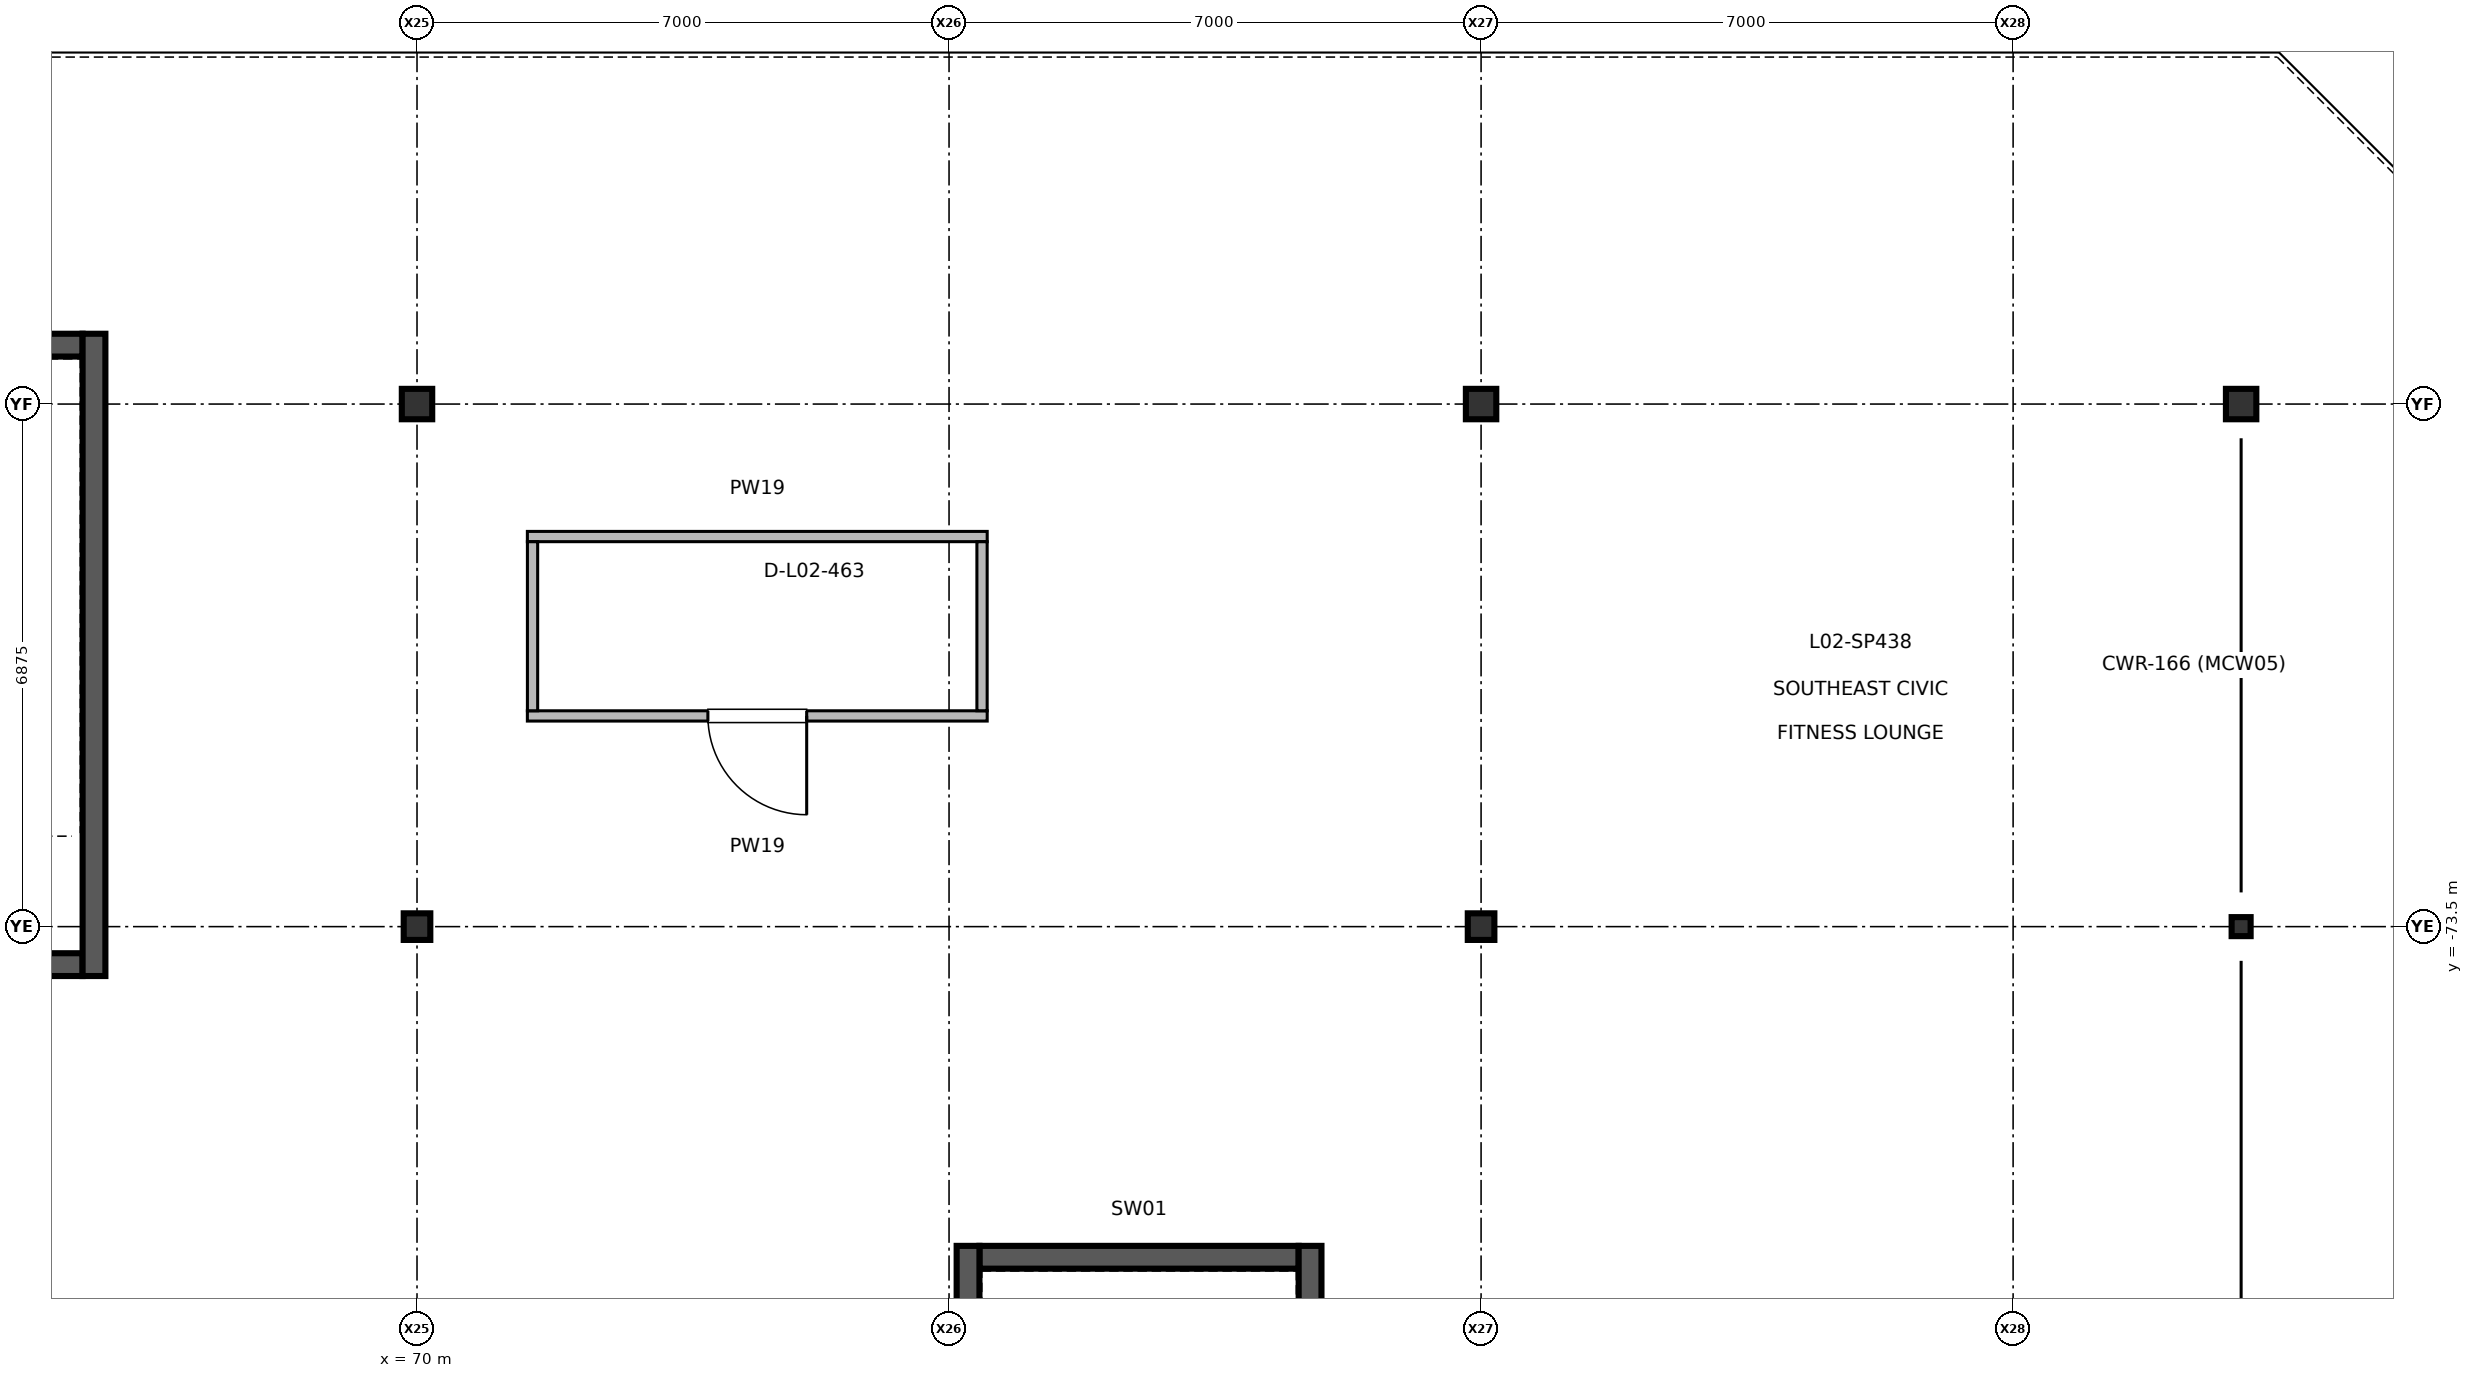
"""IFC4 building model, lengths in metres.
Left out: names, types, materials, properties, quantities, classifications, styles, units other than length and angle.
Written with IfcOpenShell. Run it as: python <this file> out.ifc"""

import sys

from ifc_helpers import new_model, si_unit, direction, frame, frame_2d, origin, origin_2d, place, context, subcontext, project, spatial, rectangle, i_section, extrude, element, fill, save


model = new_model("IFC4")
c1 = context("Model", 3, precision=1e-05, world=origin(), true_north=direction((0.0, 1.0)))
c2 = subcontext(c1, "Body", "Model", "MODEL_VIEW")
j1 = project(units=[si_unit("LENGTHUNIT", "METRE"), si_unit("PLANEANGLEUNIT", "RADIAN")], contexts=[c1])
p1 = place(None, origin())
s1 = spatial("IfcSite", under=j1, at=p1, CompositionType="ELEMENT")
p2 = place(p1, origin())
s2 = spatial("IfcBuilding", under=s1, at=p2, CompositionType="ELEMENT")
p3 = place(p2, frame((0.0, 0.0, 6.0)))
s3 = spatial("IfcBuildingStorey", under=s2, at=p3, CompositionType="ELEMENT", Elevation=6.0)
p4 = place(p3, frame((70.0, -73.5, 0.0), z_axis=(0.0, 0.0, 1.0), x_axis=(1.0, 0.0, 0.0)))
e1 = element("IfcColumn", 1, at=p4, inside=s3, PredefinedType="COLUMN", context=c2, shape_type="SweptSolid", body=[
    extrude(i_section(OverallWidth=0.35, OverallDepth=0.35, WebThickness=0.012, FlangeThickness=0.019, at=origin_2d()), origin(), (0.0, 0.0, 1.0), 5.4),
])
p5 = place(p3, frame((70.0, -66.625, 0.0), z_axis=(0.0, 0.0, 1.0), x_axis=(1.0, 0.0, 0.0)))
e2 = element("IfcColumn", 2, at=p5, inside=s3, PredefinedType="COLUMN", context=c2, shape_type="SweptSolid", body=[
    extrude(i_section(OverallWidth=0.4, OverallDepth=0.4, WebThickness=0.013, FlangeThickness=0.021, at=origin_2d()), origin(), (0.0, 0.0, 1.0), 5.4),
])
p6 = place(p3, frame((84.0, -73.5, 0.0), z_axis=(0.0, 0.0, 1.0), x_axis=(1.0, 0.0, 0.0)))
e3 = element("IfcColumn", 3, at=p6, inside=s3, PredefinedType="COLUMN", context=c2, shape_type="SweptSolid", body=[
    extrude(i_section(OverallWidth=0.35, OverallDepth=0.35, WebThickness=0.012, FlangeThickness=0.019, at=origin_2d()), origin(), (0.0, 0.0, 1.0), 5.4),
])
p7 = place(p3, frame((84.0, -66.625, 0.0), z_axis=(0.0, 0.0, 1.0), x_axis=(1.0, 0.0, 0.0)))
e4 = element("IfcColumn", 4, at=p7, inside=s3, PredefinedType="COLUMN", context=c2, shape_type="SweptSolid", body=[
    extrude(i_section(OverallWidth=0.4, OverallDepth=0.4, WebThickness=0.013, FlangeThickness=0.021, at=origin_2d()), origin(), (0.0, 0.0, 1.0), 5.4),
])
p8 = place(p3, frame((94.0, -73.5, 0.0), z_axis=(0.0, 0.0, 1.0), x_axis=(1.0, 0.0, 0.0)))
e5 = element("IfcColumn", 5, at=p8, inside=s3, PredefinedType="COLUMN", context=c2, shape_type="SweptSolid", body=[
    extrude(i_section(OverallWidth=0.25, OverallDepth=0.25, WebThickness=0.009, FlangeThickness=0.014, at=origin_2d()), origin(), (0.0, 0.0, 1.0), 5.4),
])
p9 = place(p3, frame((94.0, -66.625, 0.0), z_axis=(0.0, 0.0, 1.0), x_axis=(1.0, 0.0, 0.0)))
e6 = element("IfcColumn", 6, at=p9, inside=s3, PredefinedType="COLUMN", context=c2, shape_type="SweptSolid", body=[
    extrude(i_section(OverallWidth=0.4, OverallDepth=0.4, WebThickness=0.013, FlangeThickness=0.021, at=origin_2d()), origin(), (0.0, 0.0, 1.0), 5.4),
])
p10 = place(p3, frame((77.502, -70.728, 0.0), z_axis=(0.0, 0.0, 1.0), x_axis=(-1.0, 0.0, 0.0)))
e7 = element("IfcWall", 7, at=p10, inside=s3, PredefinedType="PARTITIONING", context=c2, shape_type="SweptSolid", body=[
    extrude(rectangle(XDim=6.05, YDim=0.135, at=frame_2d((3.025, 0.0))), origin(), (0.0, 0.0, 1.0), 4.42),
])
p11 = place(p10, frame((2.375, 0.0, 0.0)))
e8 = element("IfcOpeningElement", 8, at=p11, cuts=e7, PredefinedType="OPENING", context=c2, shape_type="SweptSolid", body=[
    extrude(rectangle(XDim=1.3, YDim=2.3, at=frame_2d((0.65, 1.15))), frame((0.0, 0.077, 0.0), z_axis=(0.0, -1.0, 0.0), x_axis=(1.0, 0.0, 0.0)), (0.0, 0.0, 1.0), 0.155),
])
p12 = place(p3, frame((71.452, -68.368, 0.0), z_axis=(0.0, 0.0, 1.0), x_axis=(1.0, 0.0, 0.0)))
e9 = element("IfcWall", 9, at=p12, inside=s3, PredefinedType="PARTITIONING", context=c2, shape_type="SweptSolid", body=[
    extrude(rectangle(XDim=6.05, YDim=0.135, at=frame_2d((3.025, 0.0))), origin(), (0.0, 0.0, 1.0), 4.42),
])
for number, where, z_axis, x_axis in (
    (10, (71.52, -70.66, 0.0), (0.0, 0.0, 1.0), (0.0, 1.0, 0.0)),
    (11, (77.434, -70.66, 0.0), (0.0, 0.0, 1.0), (0.0, 1.0, 0.0)),
):
    element("IfcWall", number, at=place(p3, frame(where, z_axis=z_axis, x_axis=x_axis)), inside=s3, PredefinedType="PARTITIONING", context=c2, shape_type="SweptSolid", body=[
        extrude(rectangle(XDim=2.224, YDim=0.135, at=frame_2d((1.112, 0.0))), origin(), (0.0, 0.0, 1.0), 4.42),
    ])
p13 = place(p3, frame((77.4, -77.85, 0.0), z_axis=(0.0, 0.0, 1.0), x_axis=(1.0, 0.0, 0.0)))
e12 = element("IfcWall", 12, at=p13, inside=s3, PredefinedType="SHEAR", context=c2, shape_type="SweptSolid", body=[
    extrude(rectangle(XDim=4.2, YDim=0.3, at=frame_2d((2.1, 0.0))), origin(), (0.0, 0.0, 1.0), 5.15),
])
for number, where, z_axis, x_axis in (
    (13, (77.25, -86.15, 0.0), (0.0, 0.0, 1.0), (0.0, 1.0, 0.0)),
    (14, (81.75, -86.15, 0.0), (0.0, 0.0, 1.0), (0.0, 1.0, 0.0)),
):
    element("IfcWall", number, at=place(p3, frame(where, z_axis=z_axis, x_axis=x_axis)), inside=s3, PredefinedType="SHEAR", context=c2, shape_type="SweptSolid", body=[
        extrude(rectangle(XDim=8.45, YDim=0.3, at=frame_2d((4.225, 0.0))), origin(), (0.0, 0.0, 1.0), 5.15),
    ])
p14 = place(p3, frame((61.4, -74.0, 0.0), z_axis=(0.0, 0.0, 1.0), x_axis=(1.0, 0.0, 0.0)))
e15 = element("IfcWall", 15, at=p14, inside=s3, PredefinedType="SHEAR", context=c2, shape_type="SweptSolid", body=[
    extrude(rectangle(XDim=4.2, YDim=0.3, at=frame_2d((2.1, 0.0))), origin(), (0.0, 0.0, 1.0), 5.15),
])
p15 = place(p14, frame((1.375, 0.0, 0.0)))
e16 = element("IfcOpeningElement", 16, at=p15, cuts=e15, PredefinedType="OPENING", context=c2, shape_type="SweptSolid", body=[
    extrude(rectangle(XDim=1.45, YDim=2.2, at=frame_2d((0.725, 1.1))), frame((0.0, 0.16, 0.0), z_axis=(0.0, -1.0, 0.0), x_axis=(1.0, 0.0, 0.0)), (0.0, 0.0, 1.0), 0.32),
])
p16 = place(p3, frame((61.4, -65.85, 0.0), z_axis=(0.0, 0.0, 1.0), x_axis=(1.0, 0.0, 0.0)))
e17 = element("IfcWall", 17, at=p16, inside=s3, PredefinedType="SHEAR", context=c2, shape_type="SweptSolid", body=[
    extrude(rectangle(XDim=4.2, YDim=0.3, at=frame_2d((2.1, 0.0))), origin(), (0.0, 0.0, 1.0), 5.15),
])
p17 = place(p3, frame((65.75, -74.15, 0.0), z_axis=(0.0, 0.0, 1.0), x_axis=(0.0, 1.0, 0.0)))
e18 = element("IfcWall", 18, at=p17, inside=s3, PredefinedType="SHEAR", context=c2, shape_type="SweptSolid", body=[
    extrude(rectangle(XDim=8.45, YDim=0.3, at=frame_2d((4.225, 0.0))), origin(), (0.0, 0.0, 1.0), 5.15),
])
p18 = place(p11, origin())
e19 = element("IfcDoor", 19, at=p18, inside=s3, OperationType="SINGLE_SWING_LEFT", PredefinedType="DOOR", context=c2, shape_type="SweptSolid", body=[
    extrude(rectangle(XDim=1.3, YDim=2.3, at=frame_2d((0.65, 1.15))), frame((0.0, 0.025, 0.0), z_axis=(0.0, -1.0, 0.0), x_axis=(1.0, 0.0, 0.0)), (0.0, 0.0, 1.0), 0.05),
])
fill(e8, e19)
save(model, sys.argv[1])
